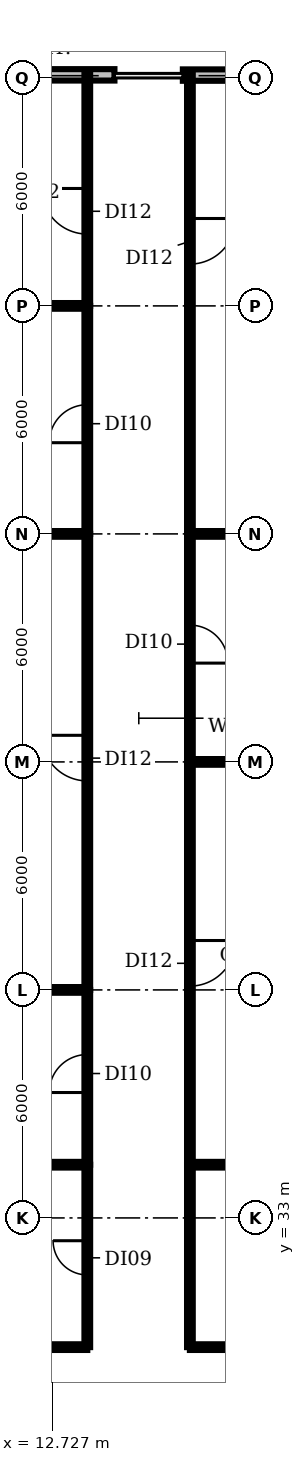
"""IFC4 building model, lengths in metres.
Left out: names, types, materials, properties, quantities, classifications, styles, units other than length and angle.
Written with IfcOpenShell. Run it as: python <this file> out.ifc"""

import sys

from ifc_helpers import new_model, si_unit, direction, frame, frame_2d, origin, place, context, subcontext, project, spatial, rectangle, extrude, element, fill, save


model = new_model("IFC4")
c1 = context("Model", 3, precision=1e-05, world=origin(), true_north=direction((0.0, 1.0)))
c2 = subcontext(c1, "Body", "Model", "MODEL_VIEW")
j1 = project(units=[si_unit("LENGTHUNIT", "METRE"), si_unit("PLANEANGLEUNIT", "RADIAN")], contexts=[c1])
p1 = place(None, origin())
s1 = spatial("IfcSite", under=j1, at=p1, CompositionType="ELEMENT")
p2 = place(p1, origin())
s2 = spatial("IfcBuilding", under=s1, at=p2, CompositionType="ELEMENT")
p3 = place(p2, frame((0.0, 0.0, 58.4)))
s3 = spatial("IfcBuildingStorey", under=s2, at=p3, CompositionType="ELEMENT", Elevation=58.4)
p4 = place(p3, frame((25.058, 63.074, 0.0), z_axis=(0.0, 0.0, 1.0), x_axis=(-1.0, 0.0, 0.0)))
e1 = element("IfcWall", 1, at=p4, inside=s3, PredefinedType="SOLIDWALL", context=c2, shape_type="SweptSolid", body=[
    extrude(rectangle(XDim=8.894, YDim=0.3, at=frame_2d((4.447, 0.0))), origin(), (0.0, 0.0, 1.0), 3.85),
])
p5 = place(p3, frame((14.365, 63.08, 0.0), z_axis=(0.0, 0.0, 1.0), x_axis=(-1.0, 0.0, 0.0)))
e2 = element("IfcWall", 2, at=p5, inside=s3, PredefinedType="SOLIDWALL", context=c2, shape_type="SweptSolid", body=[
    extrude(rectangle(XDim=4.729, YDim=0.3, at=frame_2d((2.365, 0.0))), origin(), (0.0, 0.0, 1.0), 3.85),
])
p6 = place(p3, frame((-1.87, 57.0, 0.0), z_axis=(0.0, 0.0, 1.0), x_axis=(1.0, 0.0, 0.0)))
e3 = element("IfcWall", 3, at=p6, inside=s3, PredefinedType="PARTITIONING", context=c2, shape_type="SweptSolid", body=[
    extrude(rectangle(XDim=15.52, YDim=0.15, at=frame_2d((7.76, 0.0))), origin(), (0.0, 0.0, 1.0), 2.83),
])
p7 = place(p3, frame((-1.72, 51.0, 0.0), z_axis=(0.0, 0.0, 1.0), x_axis=(1.0, 0.0, 0.0)))
e4 = element("IfcWall", 4, at=p7, inside=s3, PredefinedType="PARTITIONING", context=c2, shape_type="SweptSolid", body=[
    extrude(rectangle(XDim=15.37, YDim=0.15, at=frame_2d((7.685, 0.0))), origin(), (0.0, 0.0, 1.0), 2.83),
])
p8 = place(p3, frame((-1.4, 39.0, 0.0), z_axis=(0.0, 0.0, 1.0), x_axis=(1.0, 0.0, 0.0)))
e5 = element("IfcWall", 5, at=p8, inside=s3, PredefinedType="PARTITIONING", context=c2, shape_type="SweptSolid", body=[
    extrude(rectangle(XDim=15.05, YDim=0.15, at=frame_2d((7.525, 0.0))), origin(), (0.0, 0.0, 1.0), 2.83),
])
p9 = place(p3, frame((-1.28, 34.4, 0.0), z_axis=(0.0, 0.0, 1.0), x_axis=(1.0, 0.0, 0.0)))
e6 = element("IfcWall", 6, at=p9, inside=s3, PredefinedType="PARTITIONING", context=c2, shape_type="SweptSolid", body=[
    extrude(rectangle(XDim=14.93, YDim=0.15, at=frame_2d((7.465, 0.0))), origin(), (0.0, 0.0, 1.0), 2.83),
])
p10 = place(p3, frame((8.8, 29.6, 0.0), z_axis=(0.0, 0.0, 1.0), x_axis=(1.0, 0.0, 0.0)))
e7 = element("IfcWall", 7, at=p10, inside=s3, PredefinedType="PARTITIONING", context=c2, shape_type="SweptSolid", body=[
    extrude(rectangle(XDim=4.85, YDim=0.15, at=frame_2d((2.425, 0.0))), origin(), (0.0, 0.0, 1.0), 2.83),
])
p11 = place(p3, frame((13.65, 29.6, 0.0), z_axis=(0.0, 0.0, 1.0), x_axis=(0.0, 1.0, 0.0)))
e8 = element("IfcWall", 8, at=p11, inside=s3, PredefinedType="PARTITIONING", context=c2, shape_type="SweptSolid", body=[
    extrude(rectangle(XDim=4.8, YDim=0.15, at=frame_2d((2.4, 0.0))), origin(), (0.0, 0.0, 1.0), 2.83),
])
p12 = place(p11, frame((1.9, 0.0, 0.0)))
e9 = element("IfcOpeningElement", 9, at=p12, cuts=e8, PredefinedType="OPENING", context=c2, shape_type="SweptSolid", body=[
    extrude(rectangle(XDim=0.9, YDim=2.1, at=frame_2d((0.45, 1.05))), frame((0.0, 0.085, 0.0), z_axis=(0.0, -1.0, 0.0), x_axis=(1.0, 0.0, 0.0)), (0.0, 0.0, 1.0), 0.17),
])
p13 = place(p3, frame((13.65, 34.4, 0.0), z_axis=(0.0, 0.0, 1.0), x_axis=(0.0, 1.0, 0.0)))
e10 = element("IfcWall", 10, at=p13, inside=s3, PredefinedType="PARTITIONING", context=c2, shape_type="SweptSolid", body=[
    extrude(rectangle(XDim=4.6, YDim=0.15, at=frame_2d((2.3, 0.0))), origin(), (0.0, 0.0, 1.0), 2.83),
])
p14 = place(p13, frame((1.9, 0.0, 0.0)))
e11 = element("IfcOpeningElement", 11, at=p14, cuts=e10, PredefinedType="OPENING", context=c2, shape_type="SweptSolid", body=[
    extrude(rectangle(XDim=1.0, YDim=2.1, at=frame_2d((0.5, 1.05))), frame((0.0, 0.085, 0.0), z_axis=(0.0, -1.0, 0.0), x_axis=(1.0, 0.0, 0.0)), (0.0, 0.0, 1.0), 0.17),
])
p15 = place(p3, frame((13.65, 39.0, 0.0), z_axis=(0.0, 0.0, 1.0), x_axis=(0.0, 1.0, 0.0)))
e12 = element("IfcWall", 12, at=p15, inside=s3, PredefinedType="PARTITIONING", context=c2, shape_type="SweptSolid", body=[
    extrude(rectangle(XDim=12.0, YDim=0.15, at=frame_2d((6.0, 0.0))), origin(), (0.0, 0.0, 1.0), 2.83),
])
p16 = place(p15, frame((5.5, 0.0, 0.0)))
e13 = element("IfcOpeningElement", 13, at=p16, cuts=e12, PredefinedType="OPENING", context=c2, shape_type="SweptSolid", body=[
    extrude(rectangle(XDim=1.2, YDim=2.1, at=frame_2d((0.6, 1.05))), frame((0.0, 0.085, 0.0), z_axis=(0.0, -1.0, 0.0), x_axis=(1.0, 0.0, 0.0)), (0.0, 0.0, 1.0), 0.17),
])
p17 = place(p3, frame((13.65, 51.0, 0.0), z_axis=(0.0, 0.0, 1.0), x_axis=(0.0, 1.0, 0.0)))
e14 = element("IfcWall", 14, at=p17, inside=s3, PredefinedType="PARTITIONING", context=c2, shape_type="SweptSolid", body=[
    extrude(rectangle(XDim=6.0, YDim=0.15, at=frame_2d((3.0, 0.0))), origin(), (0.0, 0.0, 1.0), 2.83),
])
p18 = place(p17, frame((2.4, 0.0, 0.0)))
e15 = element("IfcOpeningElement", 15, at=p18, cuts=e14, PredefinedType="OPENING", context=c2, shape_type="SweptSolid", body=[
    extrude(rectangle(XDim=1.0, YDim=2.1, at=frame_2d((0.5, 1.05))), frame((0.0, 0.085, 0.0), z_axis=(0.0, -1.0, 0.0), x_axis=(1.0, 0.0, 0.0)), (0.0, 0.0, 1.0), 0.17),
])
p19 = place(p3, frame((13.65, 57.0, 0.0), z_axis=(0.0, 0.0, 1.0), x_axis=(0.0, 1.0, 0.0)))
e16 = element("IfcWall", 16, at=p19, inside=s3, PredefinedType="PARTITIONING", context=c2, shape_type="SweptSolid", body=[
    extrude(rectangle(XDim=6.118, YDim=0.15, at=frame_2d((3.059, 0.0))), origin(), (0.0, 0.0, 1.0), 2.83),
])
p20 = place(p19, frame((1.89, 0.0, 0.0)))
e17 = element("IfcOpeningElement", 17, at=p20, cuts=e16, PredefinedType="OPENING", context=c2, shape_type="SweptSolid", body=[
    extrude(rectangle(XDim=1.2, YDim=2.1, at=frame_2d((0.6, 1.05))), frame((0.0, 0.085, 0.0), z_axis=(0.0, -1.0, 0.0), x_axis=(1.0, 0.0, 0.0)), (0.0, 0.0, 1.0), 0.17),
])
p21 = place(p3, frame((16.35, 29.6, 0.0), z_axis=(0.0, 0.0, 1.0), x_axis=(0.0, 1.0, 0.0)))
e18 = element("IfcWall", 18, at=p21, inside=s3, PredefinedType="PARTITIONING", context=c2, shape_type="SweptSolid", body=[
    extrude(rectangle(XDim=4.8, YDim=0.15, at=frame_2d((2.4, 0.0))), origin(), (0.0, 0.0, 1.0), 2.83),
])
p22 = place(p3, frame((16.35, 29.6, 0.0), z_axis=(0.0, 0.0, 1.0), x_axis=(1.0, 0.0, 0.0)))
e19 = element("IfcWall", 19, at=p22, inside=s3, PredefinedType="PARTITIONING", context=c2, shape_type="SweptSolid", body=[
    extrude(rectangle(XDim=5.06, YDim=0.15, at=frame_2d((2.53, 0.0))), origin(), (0.0, 0.0, 1.0), 2.83),
])
p23 = place(p3, frame((16.35, 34.4, 0.0), z_axis=(0.0, 0.0, 1.0), x_axis=(1.0, 0.0, 0.0)))
e20 = element("IfcWall", 20, at=p23, inside=s3, PredefinedType="PARTITIONING", context=c2, shape_type="SweptSolid", body=[
    extrude(rectangle(XDim=8.66, YDim=0.15, at=frame_2d((4.33, 0.0))), origin(), (0.0, 0.0, 1.0), 2.83),
])
p24 = place(p3, frame((16.35, 45.0, 0.0), z_axis=(0.0, 0.0, 1.0), x_axis=(0.0, -1.0, 0.0)))
e21 = element("IfcWall", 21, at=p24, inside=s3, PredefinedType="PARTITIONING", context=c2, shape_type="SweptSolid", body=[
    extrude(rectangle(XDim=10.6, YDim=0.15, at=frame_2d((5.3, 0.0))), origin(), (0.0, 0.0, 1.0), 2.83),
])
p25 = place(p24, frame((4.7, 0.0, 0.0)))
e22 = element("IfcOpeningElement", 22, at=p25, cuts=e21, PredefinedType="OPENING", context=c2, shape_type="SweptSolid", body=[
    extrude(rectangle(XDim=1.2, YDim=2.1, at=frame_2d((0.6, 1.05))), frame((0.0, 0.085, 0.0), z_axis=(0.0, -1.0, 0.0), x_axis=(1.0, 0.0, 0.0)), (0.0, 0.0, 1.0), 0.17),
])
p26 = place(p3, frame((16.35, 45.0, 0.0), z_axis=(0.0, 0.0, 1.0), x_axis=(1.0, 0.0, 0.0)))
e23 = element("IfcWall", 23, at=p26, inside=s3, PredefinedType="PARTITIONING", context=c2, shape_type="SweptSolid", body=[
    extrude(rectangle(XDim=8.66, YDim=0.15, at=frame_2d((4.33, 0.0))), origin(), (0.0, 0.0, 1.0), 2.83),
])
p27 = place(p3, frame((16.35, 51.0, 0.0), z_axis=(0.0, 0.0, 1.0), x_axis=(0.0, -1.0, 0.0)))
e24 = element("IfcWall", 24, at=p27, inside=s3, PredefinedType="PARTITIONING", context=c2, shape_type="SweptSolid", body=[
    extrude(rectangle(XDim=6.0, YDim=0.15, at=frame_2d((3.0, 0.0))), origin(), (0.0, 0.0, 1.0), 2.83),
])
p28 = place(p27, frame((2.4, 0.0, 0.0)))
e25 = element("IfcOpeningElement", 25, at=p28, cuts=e24, PredefinedType="OPENING", context=c2, shape_type="SweptSolid", body=[
    extrude(rectangle(XDim=1.0, YDim=2.1, at=frame_2d((0.5, 1.05))), frame((0.0, 0.085, 0.0), z_axis=(0.0, -1.0, 0.0), x_axis=(1.0, 0.0, 0.0)), (0.0, 0.0, 1.0), 0.17),
])
p29 = place(p3, frame((16.35, 51.0, 0.0), z_axis=(0.0, 0.0, 1.0), x_axis=(1.0, 0.0, 0.0)))
e26 = element("IfcWall", 26, at=p29, inside=s3, PredefinedType="PARTITIONING", context=c2, shape_type="SweptSolid", body=[
    extrude(rectangle(XDim=8.66, YDim=0.15, at=frame_2d((4.33, 0.0))), origin(), (0.0, 0.0, 1.0), 2.83),
])
p30 = place(p3, frame((16.35, 63.118, 0.0), z_axis=(0.0, 0.0, 1.0), x_axis=(0.0, -1.0, 0.0)))
e27 = element("IfcWall", 27, at=p30, inside=s3, PredefinedType="PARTITIONING", context=c2, shape_type="SweptSolid", body=[
    extrude(rectangle(XDim=12.118, YDim=0.15, at=frame_2d((6.059, 0.0))), origin(), (0.0, 0.0, 1.0), 2.83),
])
p31 = place(p30, frame((3.818, 0.0, 0.0)))
e28 = element("IfcOpeningElement", 28, at=p31, cuts=e27, PredefinedType="OPENING", context=c2, shape_type="SweptSolid", body=[
    extrude(rectangle(XDim=1.2, YDim=2.1, at=frame_2d((0.6, 1.05))), frame((0.0, 0.085, 0.0), z_axis=(0.0, -1.0, 0.0), x_axis=(1.0, 0.0, 0.0)), (0.0, 0.0, 1.0), 0.17),
])
p32 = place(p12, origin())
e29 = element("IfcDoor", 29, at=p32, inside=s3, OperationType="SINGLE_SWING_RIGHT", PredefinedType="DOOR", context=c2, shape_type="SweptSolid", body=[
    extrude(rectangle(XDim=0.9, YDim=2.1, at=frame_2d((0.45, 1.05))), frame((0.0, 0.025, 0.0), z_axis=(0.0, -1.0, 0.0), x_axis=(1.0, 0.0, 0.0)), (0.0, 0.0, 1.0), 0.05),
])
fill(e9, e29)
p33 = place(p14, origin())
e30 = element("IfcDoor", 30, at=p33, inside=s3, OperationType="SINGLE_SWING_LEFT", PredefinedType="DOOR", context=c2, shape_type="SweptSolid", body=[
    extrude(rectangle(XDim=1.0, YDim=2.1, at=frame_2d((0.5, 1.05))), frame((0.0, 0.025, 0.0), z_axis=(0.0, -1.0, 0.0), x_axis=(1.0, 0.0, 0.0)), (0.0, 0.0, 1.0), 0.05),
])
fill(e11, e30)
p34 = place(p16, origin())
e31 = element("IfcDoor", 31, at=p34, inside=s3, OperationType="SINGLE_SWING_RIGHT", PredefinedType="DOOR", context=c2, shape_type="SweptSolid", body=[
    extrude(rectangle(XDim=1.2, YDim=2.1, at=frame_2d((0.6, 1.05))), frame((0.0, 0.025, 0.0), z_axis=(0.0, -1.0, 0.0), x_axis=(1.0, 0.0, 0.0)), (0.0, 0.0, 1.0), 0.05),
])
fill(e13, e31)
p35 = place(p18, origin())
e32 = element("IfcDoor", 32, at=p35, inside=s3, OperationType="SINGLE_SWING_LEFT", PredefinedType="DOOR", context=c2, shape_type="SweptSolid", body=[
    extrude(rectangle(XDim=1.0, YDim=2.1, at=frame_2d((0.5, 1.05))), frame((0.0, 0.025, 0.0), z_axis=(0.0, -1.0, 0.0), x_axis=(1.0, 0.0, 0.0)), (0.0, 0.0, 1.0), 0.05),
])
fill(e15, e32)
p36 = place(p20, origin())
e33 = element("IfcDoor", 33, at=p36, inside=s3, OperationType="SINGLE_SWING_RIGHT", PredefinedType="DOOR", context=c2, shape_type="SweptSolid", body=[
    extrude(rectangle(XDim=1.2, YDim=2.1, at=frame_2d((0.6, 1.05))), frame((0.0, 0.025, 0.0), z_axis=(0.0, -1.0, 0.0), x_axis=(1.0, 0.0, 0.0)), (0.0, 0.0, 1.0), 0.05),
])
fill(e17, e33)
p37 = place(p25, origin())
e34 = element("IfcDoor", 34, at=p37, inside=s3, OperationType="SINGLE_SWING_LEFT", PredefinedType="DOOR", context=c2, shape_type="SweptSolid", body=[
    extrude(rectangle(XDim=1.2, YDim=2.1, at=frame_2d((0.6, 1.05))), frame((0.0, 0.025, 0.0), z_axis=(0.0, -1.0, 0.0), x_axis=(1.0, 0.0, 0.0)), (0.0, 0.0, 1.0), 0.05),
])
fill(e22, e34)
p38 = place(p28, origin())
e35 = element("IfcDoor", 35, at=p38, inside=s3, OperationType="SINGLE_SWING_RIGHT", PredefinedType="DOOR", context=c2, shape_type="SweptSolid", body=[
    extrude(rectangle(XDim=1.0, YDim=2.1, at=frame_2d((0.5, 1.05))), frame((0.0, 0.025, 0.0), z_axis=(0.0, -1.0, 0.0), x_axis=(1.0, 0.0, 0.0)), (0.0, 0.0, 1.0), 0.05),
])
fill(e25, e35)
p39 = place(p31, origin())
e36 = element("IfcDoor", 36, at=p39, inside=s3, OperationType="SINGLE_SWING_LEFT", PredefinedType="DOOR", context=c2, shape_type="SweptSolid", body=[
    extrude(rectangle(XDim=1.2, YDim=2.1, at=frame_2d((0.6, 1.05))), frame((0.0, 0.025, 0.0), z_axis=(0.0, -1.0, 0.0), x_axis=(1.0, 0.0, 0.0)), (0.0, 0.0, 1.0), 0.05),
])
fill(e28, e36)
save(model, sys.argv[1])
